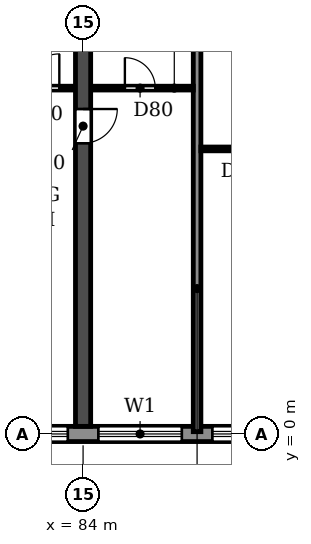
"""IFC4 building model, lengths in metres.
Left out: names, types, materials, properties, quantities, classifications, styles, units other than length and angle.
Written with IfcOpenShell. Run it as: python <this file> out.ifc"""

import sys

from ifc_helpers import new_model, si_unit, direction, frame, frame_2d, origin, place, context, subcontext, project, spatial, rectangle, extrude, element, fill, save


model = new_model("IFC4")
c1 = context("Model", 3, precision=1e-05, world=origin(), true_north=direction((0.0, 1.0)))
c2 = subcontext(c1, "Body", "Model", "MODEL_VIEW")
j1 = project(units=[si_unit("LENGTHUNIT", "METRE"), si_unit("PLANEANGLEUNIT", "RADIAN")], contexts=[c1])
p1 = place(None, origin())
s1 = spatial("IfcSite", under=j1, at=p1, CompositionType="ELEMENT")
p2 = place(p1, origin())
s2 = spatial("IfcBuilding", under=s1, at=p2, CompositionType="ELEMENT")
p3 = place(p2, frame((0.0, 0.0, 23.4)))
s3 = spatial("IfcBuildingStorey", under=s2, at=p3, CompositionType="ELEMENT", Elevation=23.4)
p4 = place(p3, frame((84.0, 0.2, 0.0), z_axis=(0.0, 0.0, 1.0), x_axis=(0.0, 1.0, 0.0)))
e1 = element("IfcWall", 1, at=p4, inside=s3, PredefinedType="SHEAR", context=c2, shape_type="SweptSolid", body=[
    extrude(rectangle(XDim=11.65, YDim=0.4, at=frame_2d((5.825, 0.0))), origin(), (0.0, 0.0, 1.0), 3.05),
])
p5 = place(p4, frame((7.45, 0.0, 0.0)))
e2 = element("IfcOpeningElement", 2, at=p5, cuts=e1, PredefinedType="OPENING", context=c2, shape_type="SweptSolid", body=[
    extrude(rectangle(XDim=0.9, YDim=2.1, at=frame_2d((0.45, 1.05))), frame((0.0, 0.21, 0.0), z_axis=(0.0, -1.0, 0.0), x_axis=(1.0, 0.0, 0.0)), (0.0, 0.0, 1.0), 0.42),
])
p6 = place(p3, frame((4.683, 0.0, 0.0), z_axis=(0.0, 0.0, 1.0), x_axis=(1.0, 0.0, 0.0)))
e3 = element("IfcWall", 3, at=p6, inside=s3, PredefinedType="STANDARD", context=c2, shape_type="SweptSolid", body=[
    extrude(rectangle(XDim=92.634, YDim=0.4, at=frame_2d((46.317, 0.0))), origin(), (0.0, 0.0, 1.0), 3.05),
])
p7 = place(p6, frame((1.717, 0.0, 0.9)))
e4 = element("IfcOpeningElement", 4, at=p7, cuts=e3, PredefinedType="OPENING", context=c2, shape_type="SweptSolid", body=[
    extrude(rectangle(XDim=2.2, YDim=1.5, at=frame_2d((1.1, 0.75))), frame((0.0, 0.21, 0.0), z_axis=(0.0, -1.0, 0.0), x_axis=(1.0, 0.0, 0.0)), (0.0, 0.0, 1.0), 0.42),
])
p8 = place(p6, frame((4.717, 0.0, 0.9)))
e5 = element("IfcOpeningElement", 5, at=p8, cuts=e3, PredefinedType="OPENING", context=c2, shape_type="SweptSolid", body=[
    extrude(rectangle(XDim=2.2, YDim=1.5, at=frame_2d((1.1, 0.75))), frame((0.0, 0.21, 0.0), z_axis=(0.0, -1.0, 0.0), x_axis=(1.0, 0.0, 0.0)), (0.0, 0.0, 1.0), 0.42),
])
p9 = place(p6, frame((7.717, 0.0, 0.9)))
e6 = element("IfcOpeningElement", 6, at=p9, cuts=e3, PredefinedType="OPENING", context=c2, shape_type="SweptSolid", body=[
    extrude(rectangle(XDim=2.2, YDim=1.5, at=frame_2d((1.1, 0.75))), frame((0.0, 0.21, 0.0), z_axis=(0.0, -1.0, 0.0), x_axis=(1.0, 0.0, 0.0)), (0.0, 0.0, 1.0), 0.42),
])
p10 = place(p6, frame((10.717, 0.0, 0.9)))
e7 = element("IfcOpeningElement", 7, at=p10, cuts=e3, PredefinedType="OPENING", context=c2, shape_type="SweptSolid", body=[
    extrude(rectangle(XDim=2.2, YDim=1.5, at=frame_2d((1.1, 0.75))), frame((0.0, 0.21, 0.0), z_axis=(0.0, -1.0, 0.0), x_axis=(1.0, 0.0, 0.0)), (0.0, 0.0, 1.0), 0.42),
])
p11 = place(p6, frame((13.717, 0.0, 0.9)))
e8 = element("IfcOpeningElement", 8, at=p11, cuts=e3, PredefinedType="OPENING", context=c2, shape_type="SweptSolid", body=[
    extrude(rectangle(XDim=2.2, YDim=1.5, at=frame_2d((1.1, 0.75))), frame((0.0, 0.21, 0.0), z_axis=(0.0, -1.0, 0.0), x_axis=(1.0, 0.0, 0.0)), (0.0, 0.0, 1.0), 0.42),
])
p12 = place(p6, frame((16.717, 0.0, 0.9)))
e9 = element("IfcOpeningElement", 9, at=p12, cuts=e3, PredefinedType="OPENING", context=c2, shape_type="SweptSolid", body=[
    extrude(rectangle(XDim=2.2, YDim=1.5, at=frame_2d((1.1, 0.75))), frame((0.0, 0.21, 0.0), z_axis=(0.0, -1.0, 0.0), x_axis=(1.0, 0.0, 0.0)), (0.0, 0.0, 1.0), 0.42),
])
p13 = place(p6, frame((19.917, 0.0, 0.0)))
e10 = element("IfcOpeningElement", 10, at=p13, cuts=e3, PredefinedType="OPENING", context=c2, shape_type="SweptSolid", body=[
    extrude(rectangle(XDim=1.8, YDim=2.4, at=frame_2d((0.9, 1.2))), frame((0.0, 0.21, 0.0), z_axis=(0.0, -1.0, 0.0), x_axis=(1.0, 0.0, 0.0)), (0.0, 0.0, 1.0), 0.42),
])
p14 = place(p6, frame((22.717, 0.0, 0.9)))
e11 = element("IfcOpeningElement", 11, at=p14, cuts=e3, PredefinedType="OPENING", context=c2, shape_type="SweptSolid", body=[
    extrude(rectangle(XDim=2.2, YDim=1.5, at=frame_2d((1.1, 0.75))), frame((0.0, 0.21, 0.0), z_axis=(0.0, -1.0, 0.0), x_axis=(1.0, 0.0, 0.0)), (0.0, 0.0, 1.0), 0.42),
])
p15 = place(p6, frame((25.717, 0.0, 0.9)))
e12 = element("IfcOpeningElement", 12, at=p15, cuts=e3, PredefinedType="OPENING", context=c2, shape_type="SweptSolid", body=[
    extrude(rectangle(XDim=2.2, YDim=1.5, at=frame_2d((1.1, 0.75))), frame((0.0, 0.21, 0.0), z_axis=(0.0, -1.0, 0.0), x_axis=(1.0, 0.0, 0.0)), (0.0, 0.0, 1.0), 0.42),
])
p16 = place(p6, frame((28.717, 0.0, 0.9)))
e13 = element("IfcOpeningElement", 13, at=p16, cuts=e3, PredefinedType="OPENING", context=c2, shape_type="SweptSolid", body=[
    extrude(rectangle(XDim=2.2, YDim=1.5, at=frame_2d((1.1, 0.75))), frame((0.0, 0.21, 0.0), z_axis=(0.0, -1.0, 0.0), x_axis=(1.0, 0.0, 0.0)), (0.0, 0.0, 1.0), 0.42),
])
p17 = place(p6, frame((31.917, 0.0, 0.0)))
e14 = element("IfcOpeningElement", 14, at=p17, cuts=e3, PredefinedType="OPENING", context=c2, shape_type="SweptSolid", body=[
    extrude(rectangle(XDim=1.8, YDim=2.4, at=frame_2d((0.9, 1.2))), frame((0.0, 0.21, 0.0), z_axis=(0.0, -1.0, 0.0), x_axis=(1.0, 0.0, 0.0)), (0.0, 0.0, 1.0), 0.42),
])
p18 = place(p6, frame((34.717, 0.0, 0.9)))
e15 = element("IfcOpeningElement", 15, at=p18, cuts=e3, PredefinedType="OPENING", context=c2, shape_type="SweptSolid", body=[
    extrude(rectangle(XDim=2.2, YDim=1.5, at=frame_2d((1.1, 0.75))), frame((0.0, 0.21, 0.0), z_axis=(0.0, -1.0, 0.0), x_axis=(1.0, 0.0, 0.0)), (0.0, 0.0, 1.0), 0.42),
])
p19 = place(p6, frame((37.717, 0.0, 0.9)))
e16 = element("IfcOpeningElement", 16, at=p19, cuts=e3, PredefinedType="OPENING", context=c2, shape_type="SweptSolid", body=[
    extrude(rectangle(XDim=2.2, YDim=1.5, at=frame_2d((1.1, 0.75))), frame((0.0, 0.21, 0.0), z_axis=(0.0, -1.0, 0.0), x_axis=(1.0, 0.0, 0.0)), (0.0, 0.0, 1.0), 0.42),
])
p20 = place(p6, frame((40.717, 0.0, 0.9)))
e17 = element("IfcOpeningElement", 17, at=p20, cuts=e3, PredefinedType="OPENING", context=c2, shape_type="SweptSolid", body=[
    extrude(rectangle(XDim=2.2, YDim=1.5, at=frame_2d((1.1, 0.75))), frame((0.0, 0.21, 0.0), z_axis=(0.0, -1.0, 0.0), x_axis=(1.0, 0.0, 0.0)), (0.0, 0.0, 1.0), 0.42),
])
p21 = place(p6, frame((43.917, 0.0, 0.0)))
e18 = element("IfcOpeningElement", 18, at=p21, cuts=e3, PredefinedType="OPENING", context=c2, shape_type="SweptSolid", body=[
    extrude(rectangle(XDim=1.8, YDim=2.4, at=frame_2d((0.9, 1.2))), frame((0.0, 0.21, 0.0), z_axis=(0.0, -1.0, 0.0), x_axis=(1.0, 0.0, 0.0)), (0.0, 0.0, 1.0), 0.42),
])
p22 = place(p6, frame((46.717, 0.0, 0.9)))
e19 = element("IfcOpeningElement", 19, at=p22, cuts=e3, PredefinedType="OPENING", context=c2, shape_type="SweptSolid", body=[
    extrude(rectangle(XDim=2.2, YDim=1.5, at=frame_2d((1.1, 0.75))), frame((0.0, 0.21, 0.0), z_axis=(0.0, -1.0, 0.0), x_axis=(1.0, 0.0, 0.0)), (0.0, 0.0, 1.0), 0.42),
])
p23 = place(p6, frame((49.717, 0.0, 0.9)))
e20 = element("IfcOpeningElement", 20, at=p23, cuts=e3, PredefinedType="OPENING", context=c2, shape_type="SweptSolid", body=[
    extrude(rectangle(XDim=2.2, YDim=1.5, at=frame_2d((1.1, 0.75))), frame((0.0, 0.21, 0.0), z_axis=(0.0, -1.0, 0.0), x_axis=(1.0, 0.0, 0.0)), (0.0, 0.0, 1.0), 0.42),
])
p24 = place(p6, frame((52.717, 0.0, 0.9)))
e21 = element("IfcOpeningElement", 21, at=p24, cuts=e3, PredefinedType="OPENING", context=c2, shape_type="SweptSolid", body=[
    extrude(rectangle(XDim=2.2, YDim=1.5, at=frame_2d((1.1, 0.75))), frame((0.0, 0.21, 0.0), z_axis=(0.0, -1.0, 0.0), x_axis=(1.0, 0.0, 0.0)), (0.0, 0.0, 1.0), 0.42),
])
p25 = place(p6, frame((55.717, 0.0, 0.9)))
e22 = element("IfcOpeningElement", 22, at=p25, cuts=e3, PredefinedType="OPENING", context=c2, shape_type="SweptSolid", body=[
    extrude(rectangle(XDim=2.2, YDim=1.5, at=frame_2d((1.1, 0.75))), frame((0.0, 0.21, 0.0), z_axis=(0.0, -1.0, 0.0), x_axis=(1.0, 0.0, 0.0)), (0.0, 0.0, 1.0), 0.42),
])
p26 = place(p6, frame((58.917, 0.0, 0.0)))
e23 = element("IfcOpeningElement", 23, at=p26, cuts=e3, PredefinedType="OPENING", context=c2, shape_type="SweptSolid", body=[
    extrude(rectangle(XDim=1.8, YDim=2.4, at=frame_2d((0.9, 1.2))), frame((0.0, 0.21, 0.0), z_axis=(0.0, -1.0, 0.0), x_axis=(1.0, 0.0, 0.0)), (0.0, 0.0, 1.0), 0.42),
])
p27 = place(p6, frame((61.717, 0.0, 0.9)))
e24 = element("IfcOpeningElement", 24, at=p27, cuts=e3, PredefinedType="OPENING", context=c2, shape_type="SweptSolid", body=[
    extrude(rectangle(XDim=2.2, YDim=1.5, at=frame_2d((1.1, 0.75))), frame((0.0, 0.21, 0.0), z_axis=(0.0, -1.0, 0.0), x_axis=(1.0, 0.0, 0.0)), (0.0, 0.0, 1.0), 0.42),
])
p28 = place(p6, frame((64.717, 0.0, 0.9)))
e25 = element("IfcOpeningElement", 25, at=p28, cuts=e3, PredefinedType="OPENING", context=c2, shape_type="SweptSolid", body=[
    extrude(rectangle(XDim=2.2, YDim=1.5, at=frame_2d((1.1, 0.75))), frame((0.0, 0.21, 0.0), z_axis=(0.0, -1.0, 0.0), x_axis=(1.0, 0.0, 0.0)), (0.0, 0.0, 1.0), 0.42),
])
p29 = place(p6, frame((67.717, 0.0, 0.9)))
e26 = element("IfcOpeningElement", 26, at=p29, cuts=e3, PredefinedType="OPENING", context=c2, shape_type="SweptSolid", body=[
    extrude(rectangle(XDim=2.2, YDim=1.5, at=frame_2d((1.1, 0.75))), frame((0.0, 0.21, 0.0), z_axis=(0.0, -1.0, 0.0), x_axis=(1.0, 0.0, 0.0)), (0.0, 0.0, 1.0), 0.42),
])
p30 = place(p6, frame((70.917, 0.0, 0.0)))
e27 = element("IfcOpeningElement", 27, at=p30, cuts=e3, PredefinedType="OPENING", context=c2, shape_type="SweptSolid", body=[
    extrude(rectangle(XDim=1.8, YDim=2.4, at=frame_2d((0.9, 1.2))), frame((0.0, 0.21, 0.0), z_axis=(0.0, -1.0, 0.0), x_axis=(1.0, 0.0, 0.0)), (0.0, 0.0, 1.0), 0.42),
])
p31 = place(p6, frame((73.717, 0.0, 0.9)))
e28 = element("IfcOpeningElement", 28, at=p31, cuts=e3, PredefinedType="OPENING", context=c2, shape_type="SweptSolid", body=[
    extrude(rectangle(XDim=2.2, YDim=1.5, at=frame_2d((1.1, 0.75))), frame((0.0, 0.21, 0.0), z_axis=(0.0, -1.0, 0.0), x_axis=(1.0, 0.0, 0.0)), (0.0, 0.0, 1.0), 0.42),
])
p32 = place(p6, frame((76.717, 0.0, 0.9)))
e29 = element("IfcOpeningElement", 29, at=p32, cuts=e3, PredefinedType="OPENING", context=c2, shape_type="SweptSolid", body=[
    extrude(rectangle(XDim=2.2, YDim=1.5, at=frame_2d((1.1, 0.75))), frame((0.0, 0.21, 0.0), z_axis=(0.0, -1.0, 0.0), x_axis=(1.0, 0.0, 0.0)), (0.0, 0.0, 1.0), 0.42),
])
p33 = place(p6, frame((79.717, 0.0, 0.9)))
e30 = element("IfcOpeningElement", 30, at=p33, cuts=e3, PredefinedType="OPENING", context=c2, shape_type="SweptSolid", body=[
    extrude(rectangle(XDim=2.2, YDim=1.5, at=frame_2d((1.1, 0.75))), frame((0.0, 0.21, 0.0), z_axis=(0.0, -1.0, 0.0), x_axis=(1.0, 0.0, 0.0)), (0.0, 0.0, 1.0), 0.42),
])
p34 = place(p6, frame((82.717, 0.0, 0.9)))
e31 = element("IfcOpeningElement", 31, at=p34, cuts=e3, PredefinedType="OPENING", context=c2, shape_type="SweptSolid", body=[
    extrude(rectangle(XDim=2.2, YDim=1.5, at=frame_2d((1.1, 0.75))), frame((0.0, 0.21, 0.0), z_axis=(0.0, -1.0, 0.0), x_axis=(1.0, 0.0, 0.0)), (0.0, 0.0, 1.0), 0.42),
])
p35 = place(p6, frame((85.717, 0.0, 0.9)))
e32 = element("IfcOpeningElement", 32, at=p35, cuts=e3, PredefinedType="OPENING", context=c2, shape_type="SweptSolid", body=[
    extrude(rectangle(XDim=2.2, YDim=1.5, at=frame_2d((1.1, 0.75))), frame((0.0, 0.21, 0.0), z_axis=(0.0, -1.0, 0.0), x_axis=(1.0, 0.0, 0.0)), (0.0, 0.0, 1.0), 0.42),
])
p36 = place(p6, frame((88.717, 0.0, 0.9)))
e33 = element("IfcOpeningElement", 33, at=p36, cuts=e3, PredefinedType="OPENING", context=c2, shape_type="SweptSolid", body=[
    extrude(rectangle(XDim=2.2, YDim=1.5, at=frame_2d((1.1, 0.75))), frame((0.0, 0.21, 0.0), z_axis=(0.0, -1.0, 0.0), x_axis=(1.0, 0.0, 0.0)), (0.0, 0.0, 1.0), 0.42),
])
p37 = place(p3, frame((87.0, 0.06, 0.0), z_axis=(0.0, 0.0, 1.0), x_axis=(0.0, 1.0, 0.0)))
e34 = element("IfcWall", 34, at=p37, inside=s3, PredefinedType="PARTITIONING", context=c2, shape_type="SweptSolid", body=[
    extrude(rectangle(XDim=11.78, YDim=0.2, at=frame_2d((5.89, 0.0))), origin(), (0.0, 0.0, 1.0), 3.05),
])
p38 = place(p3, frame((87.1, 7.5, 0.0), z_axis=(0.0, 0.0, 1.0), x_axis=(1.0, 0.0, 0.0)))
e35 = element("IfcWall", 35, at=p38, inside=s3, PredefinedType="PARTITIONING", context=c2, shape_type="SweptSolid", body=[
    extrude(rectangle(XDim=2.69, YDim=0.1, at=frame_2d((1.345, 0.0))), origin(), (0.0, 0.0, 1.0), 3.05),
])
p39 = place(p38, frame((1.0, 0.0, 0.0)))
e36 = element("IfcOpeningElement", 36, at=p39, cuts=e35, PredefinedType="OPENING", context=c2, shape_type="SweptSolid", body=[
    extrude(rectangle(XDim=0.8, YDim=2.1, at=frame_2d((0.4, 1.05))), frame((0.0, 0.06, 0.0), z_axis=(0.0, -1.0, 0.0), x_axis=(1.0, 0.0, 0.0)), (0.0, 0.0, 1.0), 0.12),
])
p40 = place(p3, frame((81.8, 9.1, 0.0), z_axis=(0.0, 0.0, 1.0), x_axis=(1.0, 0.0, 0.0)))
e37 = element("IfcWall", 37, at=p40, inside=s3, PredefinedType="PARTITIONING", context=c2, shape_type="SweptSolid", body=[
    extrude(rectangle(XDim=1.99, YDim=0.1, at=frame_2d((0.995, 0.0))), origin(), (0.0, 0.0, 1.0), 3.05),
])
p41 = place(p40, frame((0.675, 0.0, 0.0)))
e38 = element("IfcOpeningElement", 38, at=p41, cuts=e37, PredefinedType="OPENING", context=c2, shape_type="SweptSolid", body=[
    extrude(rectangle(XDim=0.9, YDim=2.1, at=frame_2d((0.45, 1.05))), frame((0.0, 0.06, 0.0), z_axis=(0.0, -1.0, 0.0), x_axis=(1.0, 0.0, 0.0)), (0.0, 0.0, 1.0), 0.12),
])
p42 = place(p3, frame((84.21, 9.1, 0.0), z_axis=(0.0, 0.0, 1.0), x_axis=(1.0, 0.0, 0.0)))
e39 = element("IfcWall", 39, at=p42, inside=s3, PredefinedType="PARTITIONING", context=c2, shape_type="SweptSolid", body=[
    extrude(rectangle(XDim=2.69, YDim=0.1, at=frame_2d((1.345, 0.0))), origin(), (0.0, 0.0, 1.0), 3.05),
])
p43 = place(p42, frame((0.89, 0.0, 0.0)))
e40 = element("IfcOpeningElement", 40, at=p43, cuts=e39, PredefinedType="OPENING", context=c2, shape_type="SweptSolid", body=[
    extrude(rectangle(XDim=0.8, YDim=2.1, at=frame_2d((0.4, 1.05))), frame((0.0, 0.06, 0.0), z_axis=(0.0, -1.0, 0.0), x_axis=(1.0, 0.0, 0.0)), (0.0, 0.0, 1.0), 0.12),
])
p44 = place(p32, origin())
e41 = element("IfcWindow", 41, at=p44, inside=s3, PartitioningType="DOUBLE_PANEL_HORIZONTAL", PredefinedType="WINDOW", context=c2, shape_type="SweptSolid", body=[
    extrude(rectangle(XDim=2.2, YDim=1.5, at=frame_2d((1.1, 0.75))), frame((0.0, 0.03, 0.0), z_axis=(0.0, -1.0, 0.0), x_axis=(1.0, 0.0, 0.0)), (0.0, 0.0, 1.0), 0.06),
])
fill(e29, e41)
p45 = place(p33, origin())
e42 = element("IfcWindow", 42, at=p45, inside=s3, PartitioningType="DOUBLE_PANEL_HORIZONTAL", PredefinedType="WINDOW", context=c2, shape_type="SweptSolid", body=[
    extrude(rectangle(XDim=2.2, YDim=1.5, at=frame_2d((1.1, 0.75))), frame((0.0, 0.03, 0.0), z_axis=(0.0, -1.0, 0.0), x_axis=(1.0, 0.0, 0.0)), (0.0, 0.0, 1.0), 0.06),
])
fill(e30, e42)
p46 = place(p34, origin())
e43 = element("IfcWindow", 43, at=p46, inside=s3, PartitioningType="DOUBLE_PANEL_HORIZONTAL", PredefinedType="WINDOW", context=c2, shape_type="SweptSolid", body=[
    extrude(rectangle(XDim=2.2, YDim=1.5, at=frame_2d((1.1, 0.75))), frame((0.0, 0.03, 0.0), z_axis=(0.0, -1.0, 0.0), x_axis=(1.0, 0.0, 0.0)), (0.0, 0.0, 1.0), 0.06),
])
fill(e31, e43)
p47 = place(p43, origin())
e44 = element("IfcDoor", 44, at=p47, inside=s3, OperationType="SINGLE_SWING_LEFT", PredefinedType="DOOR", context=c2, shape_type="SweptSolid", body=[
    extrude(rectangle(XDim=0.8, YDim=2.1, at=frame_2d((0.4, 1.05))), frame((0.0, 0.025, 0.0), z_axis=(0.0, -1.0, 0.0), x_axis=(1.0, 0.0, 0.0)), (0.0, 0.0, 1.0), 0.05),
])
fill(e40, e44)
p48 = place(p41, origin())
e45 = element("IfcDoor", 45, at=p48, inside=s3, OperationType="SINGLE_SWING_RIGHT", PredefinedType="DOOR", context=c2, shape_type="SweptSolid", body=[
    extrude(rectangle(XDim=0.9, YDim=2.1, at=frame_2d((0.45, 1.05))), frame((0.0, 0.025, 0.0), z_axis=(0.0, -1.0, 0.0), x_axis=(1.0, 0.0, 0.0)), (0.0, 0.0, 1.0), 0.05),
])
fill(e38, e45)
p49 = place(p5, frame((0.9, 0.0, 0.0), z_axis=(0.0, 0.0, 1.0), x_axis=(-1.0, 0.0, 0.0)))
e46 = element("IfcDoor", 46, at=p49, inside=s3, OperationType="SINGLE_SWING_LEFT", PredefinedType="DOOR", context=c2, shape_type="SweptSolid", body=[
    extrude(rectangle(XDim=0.9, YDim=2.1, at=frame_2d((0.45, 1.05))), frame((0.0, 0.025, 0.0), z_axis=(0.0, -1.0, 0.0), x_axis=(1.0, 0.0, 0.0)), (0.0, 0.0, 1.0), 0.05),
])
fill(e2, e46)
save(model, sys.argv[1])
